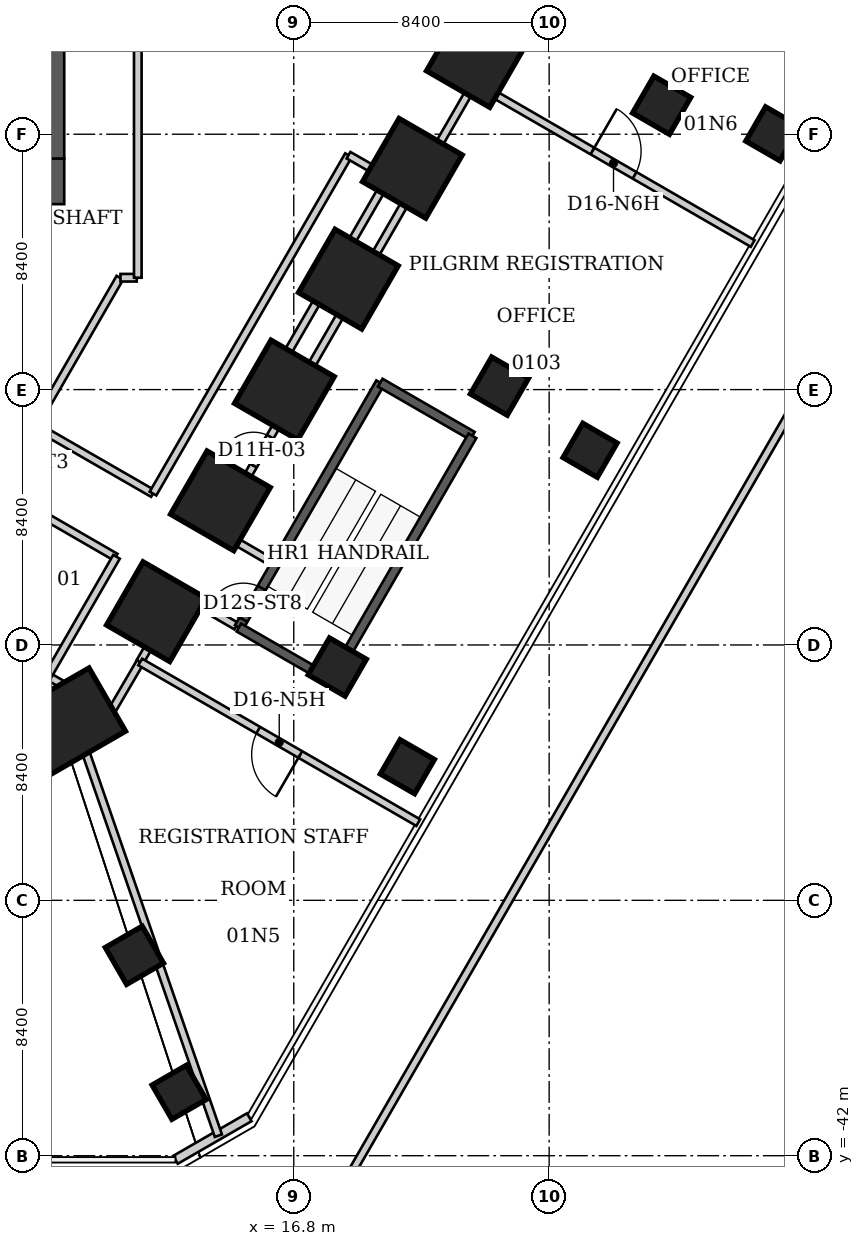
"""IFC4 building model, lengths in metres.
Left out: names, types, materials, properties, quantities, classifications, styles, units other than length and angle.
Written with IfcOpenShell. Run it as: python <this file> out.ifc"""

import sys

from ifc_helpers import new_model, si_unit, direction, frame, frame_2d, origin, origin_2d, place, context, subcontext, project, spatial, rectangle, extrude, element, fill, save


model = new_model("IFC4")
c1 = context("Model", 3, precision=1e-05, world=origin(), true_north=direction((0.0, 1.0)))
c2 = subcontext(c1, "Body", "Model", "MODEL_VIEW")
j1 = project(units=[si_unit("LENGTHUNIT", "METRE"), si_unit("PLANEANGLEUNIT", "RADIAN")], contexts=[c1])
p1 = place(None, origin())
s1 = spatial("IfcSite", under=j1, at=p1, CompositionType="ELEMENT")
p2 = place(p1, origin())
s2 = spatial("IfcBuilding", under=s1, at=p2, CompositionType="ELEMENT")
p3 = place(p2, frame((0.0, 0.0, 6.0)))
s3 = spatial("IfcBuildingStorey", under=s2, at=p3, CompositionType="ELEMENT", Elevation=6.0)
for number, where, z_axis, x_axis in (
    (1, (22.806, -5.875, 0.0), (0.0, 0.0, 1.0), (0.866, -0.5, 0.0)),
    (2, (20.701, -9.521, 0.0), (0.0, 0.0, 1.0), (0.866, -0.5, 0.0)),
    (3, (18.596, -13.167, 0.0), (0.0, 0.0, 1.0), (0.866, -0.5, 0.0)),
    (4, (16.491, -16.813, 0.0), (0.0, 0.0, 1.0), (0.866, -0.5, 0.0)),
    (5, (14.387, -20.459, 0.0), (0.0, 0.0, 1.0), (0.866, -0.5, 0.0)),
    (6, (12.282, -24.105, 0.0), (0.0, 0.0, 1.0), (0.866, -0.5, 0.0)),
):
    element("IfcColumn", number, at=place(p3, frame(where, z_axis=z_axis, x_axis=x_axis)), inside=s3, PredefinedType="COLUMN", context=c2, shape_type="SweptSolid", body=[
        extrude(rectangle(XDim=2.4, YDim=2.4, at=origin_2d()), origin(), (0.0, 0.0, 1.0), 6.0),
    ])
p4 = place(p3, frame((9.106, -27.897, 0.0), z_axis=(0.0, 0.0, 1.0), x_axis=(0.5, -0.866025403784, 0.0)))
e7 = element("IfcColumn", 7, at=p4, inside=s3, PredefinedType="COLUMN", context=c2, shape_type="SweptSolid", body=[
    extrude(rectangle(XDim=2.4, YDim=3.6, at=origin_2d()), origin(), (0.0, 0.0, 1.0), 6.0),
])
for number, where, z_axis, x_axis in (
    (8, (28.9, -7.445, 0.0), (0.0, 0.0, 1.0), (0.866, -0.5, 0.0)),
    (9, (23.565, -16.686, 0.0), (0.0, 0.0, 1.0), (0.866, -0.5, 0.0)),
    (10, (18.23, -25.926, 0.0), (0.0, 0.0, 1.0), (0.866, -0.5, 0.0)),
    (11, (11.558, -35.408, 0.0), (0.0, 0.0, 1.0), (0.5, -0.866, 0.0)),
):
    element("IfcColumn", number, at=place(p3, frame(where, z_axis=z_axis, x_axis=x_axis)), inside=s3, PredefinedType="COLUMN", context=c2, shape_type="SweptSolid", body=[
        extrude(rectangle(XDim=1.4, YDim=1.4, at=origin_2d()), origin(), (0.0, 0.0, 1.0), 6.0),
    ])
for number, where, z_axis, x_axis in (
    (12, (32.556, -8.387, 0.0), (0.0, 0.0, 1.0), (0.866, -0.5, 0.0)),
    (13, (26.547, -18.796, 0.0), (0.0, 0.0, 1.0), (0.866, -0.5, 0.0)),
    (14, (20.537, -29.205, 0.0), (0.0, 0.0, 1.0), (0.866, -0.5, 0.0)),
    (15, (13.029, -39.915, 0.0), (0.0, 0.0, 1.0), (0.5, -0.866, 0.0)),
):
    element("IfcColumn", number, at=place(p3, frame(where, z_axis=z_axis, x_axis=x_axis)), inside=s3, PredefinedType="COLUMN", context=c2, shape_type="SweptSolid", body=[
        extrude(rectangle(XDim=1.3, YDim=1.3, at=origin_2d()), origin(), (0.0, 0.0, 1.0), 6.0),
    ])
p5 = place(p3, frame((-9.25, -9.95, 0.0), z_axis=(0.0, 0.0, 1.0), x_axis=(1.0, 0.0, 0.0)))
e16 = element("IfcWall", 16, at=p5, inside=s3, PredefinedType="SHEAR", context=c2, shape_type="SweptSolid", body=[
    extrude(rectangle(XDim=18.5, YDim=1.5, at=frame_2d((9.25, 0.0))), origin(), (0.0, 0.0, 1.0), 6.0),
])
p6 = place(p5, frame((2.137, 0.0, 0.0)))
e17 = element("IfcOpeningElement", 17, at=p6, cuts=e16, PredefinedType="OPENING", context=c2, shape_type="SweptSolid", body=[
    extrude(rectangle(XDim=1.1, YDim=2.1, at=frame_2d((0.55, 1.05))), frame((0.0, 0.75, 0.0), z_axis=(0.0, -1.0, 0.0), x_axis=(1.0, 0.0, 0.0)), (0.0, 0.0, 1.0), 1.5),
])
p7 = place(p5, frame((4.762, 0.0, 0.0)))
e18 = element("IfcOpeningElement", 18, at=p7, cuts=e16, PredefinedType="OPENING", context=c2, shape_type="SweptSolid", body=[
    extrude(rectangle(XDim=1.1, YDim=2.1, at=frame_2d((0.55, 1.05))), frame((0.0, 0.75, 0.0), z_axis=(0.0, -1.0, 0.0), x_axis=(1.0, 0.0, 0.0)), (0.0, 0.0, 1.0), 1.5),
])
p8 = place(p5, frame((7.387, 0.0, 0.0)))
e19 = element("IfcOpeningElement", 19, at=p8, cuts=e16, PredefinedType="OPENING", context=c2, shape_type="SweptSolid", body=[
    extrude(rectangle(XDim=1.1, YDim=2.1, at=frame_2d((0.55, 1.05))), frame((0.0, 0.75, 0.0), z_axis=(0.0, -1.0, 0.0), x_axis=(1.0, 0.0, 0.0)), (0.0, 0.0, 1.0), 1.5),
])
p9 = place(p3, frame((8.5, -9.2, 0.0), z_axis=(0.0, 0.0, 1.0), x_axis=(0.0, 1.0, 0.0)))
e20 = element("IfcWall", 20, at=p9, inside=s3, PredefinedType="SHEAR", context=c2, shape_type="SweptSolid", body=[
    extrude(rectangle(XDim=15.3, YDim=1.5, at=frame_2d((7.65, 0.0))), origin(), (0.0, 0.0, 1.0), 6.0),
])
p10 = place(p9, frame((10.7, 0.0, 0.0)))
e21 = element("IfcOpeningElement", 21, at=p10, cuts=e20, PredefinedType="OPENING", context=c2, shape_type="SweptSolid", body=[
    extrude(rectangle(XDim=1.2, YDim=2.2, at=frame_2d((0.6, 1.1))), frame((0.0, 0.75, 0.0), z_axis=(0.0, -1.0, 0.0), x_axis=(1.0, 0.0, 0.0)), (0.0, 0.0, 1.0), 1.5),
])
p11 = place(p3, frame((15.335, -40.735, 0.0), z_axis=(0.0, 0.0, 1.0), x_axis=(-0.866056369097, -0.49994636267, 0.0)))
e22 = element("IfcWall", 22, at=p11, inside=s3, PredefinedType="SOLIDWALL", context=c2, shape_type="SweptSolid", body=[
    extrude(rectangle(XDim=2.8, YDim=0.3, at=frame_2d((1.4, 0.0))), origin(), (0.0, 0.0, 1.0), 5.84),
])
p12 = place(p3, frame((17.117, -45.292, 0.0), z_axis=(0.0, 0.0, 1.0), x_axis=(0.499999154746, 0.866025891791, 0.0)))
e23 = element("IfcWall", 23, at=p12, inside=s3, PredefinedType="PARAPET", context=c2, shape_type="SweptSolid", body=[
    extrude(rectangle(XDim=61.33, YDim=0.25, at=frame_2d((30.665, 0.0))), origin(), (0.0, 0.0, 1.0), 1.1),
])
p13 = place(p3, frame((8.28, -17.98, 0.0), z_axis=(0.0, 0.0, 1.0), x_axis=(0.499206132958, 0.866483258244, 0.0)))
e24 = element("IfcWall", 24, at=p13, inside=s3, PredefinedType="PARTITIONING", context=c2, shape_type="SweptSolid", body=[
    extrude(rectangle(XDim=5.609, YDim=0.25, at=frame_2d((2.804, 0.0))), origin(), (0.0, 0.0, 1.0), 5.84),
])
p14 = place(p3, frame((8.65, -29.11, 0.0), z_axis=(0.0, 0.0, 1.0), x_axis=(0.865736025111, 0.500500883941, 0.0)))
e25 = element("IfcWall", 25, at=p14, inside=s3, PredefinedType="PARTITIONING", context=c2, shape_type="SweptSolid", body=[
    extrude(rectangle(XDim=1.384, YDim=0.25, at=frame_2d((0.692, 0.0))), origin(), (0.0, 0.0, 1.0), 5.84),
])
p15 = place(p3, frame((8.69, -26.21, 0.0), z_axis=(0.0, 0.0, 1.0), x_axis=(0.865442434468, -0.5010083758, 0.0)))
e26 = element("IfcWall", 26, at=p15, inside=s3, PredefinedType="PARTITIONING", context=c2, shape_type="SweptSolid", body=[
    extrude(rectangle(XDim=2.415, YDim=0.25, at=frame_2d((1.208, 0.0))), origin(), (0.0, 0.0, 1.0), 5.84),
])
p16 = place(p3, frame((9.85, -28.42, 0.0), z_axis=(0.0, 0.0, 1.0), x_axis=(0.326921055124, -0.945051651349, 0.0)))
e27 = element("IfcWall", 27, at=p16, inside=s3, PredefinedType="PARTITIONING", context=c2, shape_type="SweptSolid", body=[
    extrude(rectangle(XDim=13.673, YDim=0.25, at=frame_2d((6.836, 0.0))), origin(), (0.0, 0.0, 1.0), 5.75),
])
p17 = place(p3, frame((10.38, -28.11, 0.0), z_axis=(0.0, 0.0, 1.0), x_axis=(-0.865714845822, -0.5005375168, 0.0)))
e28 = element("IfcWall", 28, at=p17, inside=s3, PredefinedType="PARTITIONING", context=c2, shape_type="SweptSolid", body=[
    extrude(rectangle(XDim=0.579, YDim=0.25, at=frame_2d((0.29, 0.0))), origin(), (0.0, 0.0, 1.0), 5.84),
])
p18 = place(p3, frame((10.78, -27.42, 0.0), z_axis=(0.0, 0.0, 1.0), x_axis=(0.504526221307, 0.863396370165, 0.0)))
e29 = element("IfcWall", 29, at=p18, inside=s3, PredefinedType="PARTITIONING", context=c2, shape_type="SweptSolid", body=[
    extrude(rectangle(XDim=1.923, YDim=0.25, at=frame_2d((0.961, 0.0))), origin(), (0.0, 0.0, 1.0), 5.84),
])
p19 = place(p3, frame((10.79, -27.42, 0.0), z_axis=(0.0, 0.0, 1.0), x_axis=(-0.510777713782, -0.859712816645, 0.0)))
e30 = element("IfcWall", 30, at=p19, inside=s3, PredefinedType="PARTITIONING", context=c2, shape_type="SweptSolid", body=[
    extrude(rectangle(XDim=0.802, YDim=0.25, at=frame_2d((0.401, 0.0))), origin(), (0.0, 0.0, 1.0), 5.84),
])
p20 = place(p3, frame((10.94, -22.31, 0.0), z_axis=(0.0, 0.0, 1.0), x_axis=(-0.865825192556, 0.500346615794, 0.0)))
e31 = element("IfcWall", 31, at=p20, inside=s3, PredefinedType="PARTITIONING", context=c2, shape_type="SweptSolid", body=[
    extrude(rectangle(XDim=6.895, YDim=0.25, at=frame_2d((3.448, 0.0))), origin(), (0.0, 0.0, 1.0), 5.84),
])
p21 = place(p20, frame((2.898, 0.0, 0.0)))
e32 = element("IfcOpeningElement", 32, at=p21, cuts=e31, PredefinedType="OPENING", context=c2, shape_type="SweptSolid", body=[
    extrude(rectangle(XDim=1.1, YDim=2.2, at=frame_2d((0.55, 1.1))), frame((0.0, 0.125, 0.0), z_axis=(0.0, -1.0, 0.0), x_axis=(1.0, 0.0, 0.0)), (0.0, 0.0, 1.0), 0.25),
])
p22 = place(p3, frame((10.97, -22.3, 0.0), z_axis=(0.0, 0.0, 1.0), x_axis=(-0.499476424687, -0.86632747918, 0.0)))
e33 = element("IfcWall", 33, at=p22, inside=s3, PredefinedType="PARTITIONING", context=c2, shape_type="SweptSolid", body=[
    extrude(rectangle(XDim=4.525, YDim=0.25, at=frame_2d((2.262, 0.0))), origin(), (0.0, 0.0, 1.0), 5.84),
])
p23 = place(p3, frame((11.1, -13.12, 0.0), z_axis=(0.0, 0.0, 1.0), x_axis=(1.0, 0.0, 0.0)))
e34 = element("IfcWall", 34, at=p23, inside=s3, PredefinedType="PARTITIONING", context=c2, shape_type="SweptSolid", body=[
    extrude(rectangle(XDim=0.535, YDim=0.25, at=frame_2d((0.268, 0.0))), origin(), (0.0, 0.0, 1.0), 5.84),
])
p24 = place(p3, frame((11.67, -13.12, 0.0), z_axis=(0.0, 0.0, 1.0), x_axis=(0.0, 1.0, 0.0)))
e35 = element("IfcWall", 35, at=p24, inside=s3, PredefinedType="PARTITIONING", context=c2, shape_type="SweptSolid", body=[
    extrude(rectangle(XDim=17.32, YDim=0.25, at=frame_2d((8.66, 0.0))), origin(), (0.0, 0.0, 1.0), 5.84),
])
p25 = place(p24, frame((7.86, 0.0, 0.0)))
e36 = element("IfcOpeningElement", 36, at=p25, cuts=e35, PredefinedType="OPENING", context=c2, shape_type="SweptSolid", body=[
    extrude(rectangle(XDim=1.6, YDim=2.4, at=frame_2d((0.8, 1.2))), frame((0.0, 0.125, 0.0), z_axis=(0.0, -1.0, 0.0), x_axis=(1.0, 0.0, 0.0)), (0.0, 0.0, 1.0), 0.25),
])
p26 = place(p3, frame((11.74, -25.76, 0.0), z_axis=(0.0, 0.0, 1.0), x_axis=(0.50150407689, 0.865155281359, 0.0)))
e37 = element("IfcWall", 37, at=p26, inside=s3, PredefinedType="PARTITIONING", context=c2, shape_type="SweptSolid", body=[
    extrude(rectangle(XDim=2.612, YDim=0.25, at=frame_2d((1.306, 0.0))), origin(), (0.0, 0.0, 1.0), 4.04),
])
p27 = place(p3, frame((12.17, -20.22, 0.0), z_axis=(0.0, 0.0, 1.0), x_axis=(-0.866588245704, 0.499023859558, 0.0)))
e38 = element("IfcWall", 38, at=p27, inside=s3, PredefinedType="PARTITIONING", context=c2, shape_type="SweptSolid", body=[
    extrude(rectangle(XDim=4.489, YDim=0.25, at=frame_2d((2.244, 0.0))), origin(), (0.0, 0.0, 1.0), 5.84),
])
p28 = place(p3, frame((13.05, -23.5, 0.0), z_axis=(0.0, 0.0, 1.0), x_axis=(0.864757143013, -0.502190286255, 0.0)))
e39 = element("IfcWall", 39, at=p28, inside=s3, PredefinedType="PARTITIONING", context=c2, shape_type="SweptSolid", body=[
    extrude(rectangle(XDim=2.151, YDim=0.25, at=frame_2d((1.075, 0.0))), origin(), (0.0, 0.0, 1.0), 5.84),
])
p29 = place(p3, frame((14.25, -21.42, 0.0), z_axis=(0.0, 0.0, 1.0), x_axis=(0.50044857655, 0.865766263046, 0.0)))
e40 = element("IfcWall", 40, at=p29, inside=s3, PredefinedType="PARTITIONING", context=c2, shape_type="SweptSolid", body=[
    extrude(rectangle(XDim=5.995, YDim=0.25, at=frame_2d((2.997, 0.0))), origin(), (0.0, 0.0, 1.0), 4.04),
])
p30 = place(p29, frame((2.448, 0.0, 0.0)))
e41 = element("IfcOpeningElement", 41, at=p30, cuts=e40, PredefinedType="OPENING", context=c2, shape_type="SweptSolid", body=[
    extrude(rectangle(XDim=1.1, YDim=2.2, at=frame_2d((0.55, 1.1))), frame((0.0, 0.125, 0.0), z_axis=(0.0, -1.0, 0.0), x_axis=(1.0, 0.0, 0.0)), (0.0, 0.0, 1.0), 0.25),
])
p31 = place(p3, frame((16.11, -22.5, 0.0), z_axis=(0.0, 0.0, 1.0), x_axis=(-0.864785766719, 0.502140993826, 0.0)))
e42 = element("IfcWall", 42, at=p31, inside=s3, PredefinedType="PARTITIONING", context=c2, shape_type="SweptSolid", body=[
    extrude(rectangle(XDim=2.151, YDim=0.25, at=frame_2d((1.075, 0.0))), origin(), (0.0, 0.0, 1.0), 5.84),
])
p32 = place(p3, frame((16.48, -15.78, 0.0), z_axis=(0.0, 0.0, 1.0), x_axis=(0.500055203419, 0.86599352973, 0.0)))
e43 = element("IfcWall", 43, at=p32, inside=s3, PredefinedType="PARTITIONING", context=c2, shape_type="SweptSolid", body=[
    extrude(rectangle(XDim=6.859, YDim=0.25, at=frame_2d((3.43, 0.0))), origin(), (0.0, 0.0, 1.0), 5.84),
])
p33 = place(p3, frame((17.25, -16.23, 0.0), z_axis=(0.0, 0.0, 1.0), x_axis=(-0.863401368682, 0.504517667242, 0.0)))
e44 = element("IfcWall", 44, at=p33, inside=s3, PredefinedType="PARTITIONING", context=c2, shape_type="SweptSolid", body=[
    extrude(rectangle(XDim=0.892, YDim=0.25, at=frame_2d((0.446, 0.0))), origin(), (0.0, 0.0, 1.0), 5.84),
])
p34 = place(p3, frame((17.25, -16.23, 0.0), z_axis=(0.0, 0.0, 1.0), x_axis=(0.499563458889, 0.866277294256, 0.0)))
e45 = element("IfcWall", 45, at=p34, inside=s3, PredefinedType="PARTITIONING", context=c2, shape_type="SweptSolid", body=[
    extrude(rectangle(XDim=10.99, YDim=0.25, at=frame_2d((5.495, 0.0))), origin(), (0.0, 0.0, 1.0), 4.04),
])
p35 = place(p3, frame((18.6, -9.09, 0.0), z_axis=(0.0, 0.0, 1.0), x_axis=(-0.500252915159, -0.8658793339, 0.0)))
e46 = element("IfcWall", 46, at=p35, inside=s3, PredefinedType="PARTITIONING", context=c2, shape_type="SweptSolid", body=[
    extrude(rectangle(XDim=12.854, YDim=0.25, at=frame_2d((6.427, 0.0))), origin(), (0.0, 0.0, 1.0), 5.84),
])
p36 = place(p3, frame((19.91, -9.84, 0.0), z_axis=(0.0, 0.0, 1.0), x_axis=(-0.867804826475, 0.496905205393, 0.0)))
e47 = element("IfcWall", 47, at=p36, inside=s3, PredefinedType="PARTITIONING", context=c2, shape_type="SweptSolid", body=[
    extrude(rectangle(XDim=1.509, YDim=0.25, at=frame_2d((0.755, 0.0))), origin(), (0.0, 0.0, 1.0), 5.84),
])
p37 = place(p3, frame((20.894, -31.045, 0.0), z_axis=(0.0, 0.0, 1.0), x_axis=(-0.865795861716, 0.500397367933, 0.0)))
e48 = element("IfcWall", 48, at=p37, inside=s3, PredefinedType="PARTITIONING", context=c2, shape_type="SweptSolid", body=[
    extrude(rectangle(XDim=10.562, YDim=0.25, at=frame_2d((5.281, 0.0))), origin(), (0.0, 0.0, 1.0), 5.75),
])
p38 = place(p37, frame((4.481, 0.0, 0.0)))
e49 = element("IfcOpeningElement", 49, at=p38, cuts=e48, PredefinedType="OPENING", context=c2, shape_type="SweptSolid", body=[
    extrude(rectangle(XDim=1.6, YDim=2.4, at=frame_2d((0.8, 1.2))), frame((0.0, 0.125, 0.0), z_axis=(0.0, -1.0, 0.0), x_axis=(1.0, 0.0, 0.0)), (0.0, 0.0, 1.0), 0.25),
])
p39 = place(p3, frame((22.74, -6.71, 0.0), z_axis=(0.0, 0.0, 1.0), x_axis=(0.866032888183, -0.499987036418, 0.0)))
e50 = element("IfcWall", 50, at=p39, inside=s3, PredefinedType="PARTITIONING", context=c2, shape_type="SweptSolid", body=[
    extrude(rectangle(XDim=10.57, YDim=0.25, at=frame_2d((5.285, 0.0))), origin(), (0.0, 0.0, 1.0), 5.75),
])
p40 = place(p39, frame((4.485, 0.0, 0.0)))
e51 = element("IfcOpeningElement", 51, at=p40, cuts=e50, PredefinedType="OPENING", context=c2, shape_type="SweptSolid", body=[
    extrude(rectangle(XDim=1.6, YDim=2.4, at=frame_2d((0.8, 1.2))), frame((0.0, 0.125, 0.0), z_axis=(0.0, -1.0, 0.0), x_axis=(1.0, 0.0, 0.0)), (0.0, 0.0, 1.0), 0.25),
])
p41 = place(p3, frame((23.96, -4.61, 0.0), z_axis=(0.0, 0.0, 1.0), x_axis=(-0.502351349133, -0.864663588932, 0.0)))
e52 = element("IfcWall", 52, at=p41, inside=s3, PredefinedType="PARTITIONING", context=c2, shape_type="SweptSolid", body=[
    extrude(rectangle(XDim=2.428, YDim=0.25, at=frame_2d((1.214, 0.0))), origin(), (0.0, 0.0, 1.0), 4.04),
])
p42 = place(p3, frame((14.994, -24.626, 0.0), z_axis=(0.0, 0.0, 1.0), x_axis=(0.500015592816, 0.866016401081, 0.0)))
e53 = element("IfcWall", 53, at=p42, inside=s3, PredefinedType="SHEAR", context=c2, shape_type="SweptSolid", body=[
    extrude(rectangle(XDim=9.3, YDim=0.3, at=frame_2d((4.65, 0.0))), origin(), (0.0, 0.0, 1.0), 6.0),
])
p43 = place(p42, frame((0.3, 0.0, 0.0)))
e54 = element("IfcOpeningElement", 54, at=p43, cuts=e53, PredefinedType="OPENING", context=c2, shape_type="SweptSolid", body=[
    extrude(rectangle(XDim=1.2, YDim=2.4, at=frame_2d((0.6, 1.2))), frame((0.0, 0.15, 0.0), z_axis=(0.0, -1.0, 0.0), x_axis=(1.0, 0.0, 0.0)), (0.0, 0.0, 1.0), 0.3),
])
p44 = place(p3, frame((19.645, -16.572, 0.0), z_axis=(0.0, 0.0, 1.0), x_axis=(0.866019471182, -0.500010275428, 0.0)))
e55 = element("IfcWall", 55, at=p44, inside=s3, PredefinedType="SHEAR", context=c2, shape_type="SweptSolid", body=[
    extrude(rectangle(XDim=3.5, YDim=0.3, at=frame_2d((1.75, 0.0))), origin(), (0.0, 0.0, 1.0), 6.0),
])
p45 = place(p3, frame((22.676, -18.322, 0.0), z_axis=(0.0, 0.0, 1.0), x_axis=(-0.499995904083, -0.86602776855, 0.0)))
e56 = element("IfcWall", 56, at=p45, inside=s3, PredefinedType="SHEAR", context=c2, shape_type="SweptSolid", body=[
    extrude(rectangle(XDim=9.3, YDim=0.3, at=frame_2d((4.65, 0.0))), origin(), (0.0, 0.0, 1.0), 6.0),
])
p46 = place(p3, frame((18.026, -26.376, 0.0), z_axis=(0.0, 0.0, 1.0), x_axis=(-0.866036909293, 0.499980071345, 0.0)))
e57 = element("IfcWall", 57, at=p46, inside=s3, PredefinedType="SHEAR", context=c2, shape_type="SweptSolid", body=[
    extrude(rectangle(XDim=3.5, YDim=0.3, at=frame_2d((1.75, 0.0))), origin(), (0.0, 0.0, 1.0), 6.0),
])
p47 = place(p30, origin())
e58 = element("IfcDoor", 58, at=p47, inside=s3, OperationType="SINGLE_SWING_LEFT", PredefinedType="DOOR", context=c2, shape_type="SweptSolid", body=[
    extrude(rectangle(XDim=1.1, YDim=2.2, at=frame_2d((0.55, 1.1))), frame((0.0, 0.025, 0.0), z_axis=(0.0, -1.0, 0.0), x_axis=(1.0, 0.0, 0.0)), (0.0, 0.0, 1.0), 0.05),
])
fill(e41, e58)
p48 = place(p38, origin())
e59 = element("IfcDoor", 59, at=p48, inside=s3, OperationType="DOUBLE_DOOR_SINGLE_SWING", PredefinedType="DOOR", context=c2, shape_type="SweptSolid", body=[
    extrude(rectangle(XDim=1.6, YDim=2.4, at=frame_2d((0.8, 1.2))), frame((0.0, 0.025, 0.0), z_axis=(0.0, -1.0, 0.0), x_axis=(1.0, 0.0, 0.0)), (0.0, 0.0, 1.0), 0.05),
])
fill(e49, e59)
p49 = place(p40, origin())
e60 = element("IfcDoor", 60, at=p49, inside=s3, OperationType="DOUBLE_DOOR_SINGLE_SWING", PredefinedType="DOOR", context=c2, shape_type="SweptSolid", body=[
    extrude(rectangle(XDim=1.6, YDim=2.4, at=frame_2d((0.8, 1.2))), frame((0.0, 0.025, 0.0), z_axis=(0.0, -1.0, 0.0), x_axis=(1.0, 0.0, 0.0)), (0.0, 0.0, 1.0), 0.05),
])
fill(e51, e60)
p50 = place(p43, origin())
e61 = element("IfcDoor", 61, at=p50, inside=s3, OperationType="SINGLE_SWING_LEFT", PredefinedType="DOOR", context=c2, shape_type="SweptSolid", body=[
    extrude(rectangle(XDim=1.2, YDim=2.4, at=frame_2d((0.6, 1.2))), frame((0.0, 0.025, 0.0), z_axis=(0.0, -1.0, 0.0), x_axis=(1.0, 0.0, 0.0)), (0.0, 0.0, 1.0), 0.05),
])
fill(e54, e61)
save(model, sys.argv[1])
